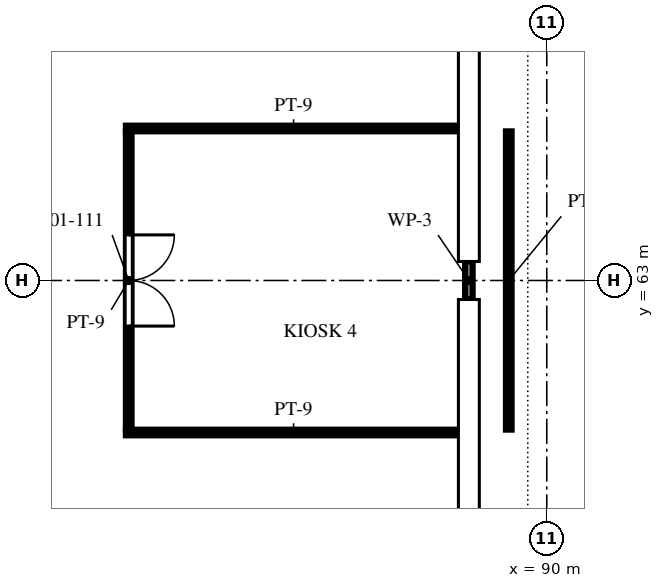
"""IFC4 building model, lengths in metres.
Left out: names, types, materials, properties, quantities, classifications, styles, units other than length and angle.
Written with IfcOpenShell. Run it as: python <this file> out.ifc"""

import sys

from ifc_helpers import new_model, si_unit, direction, frame, frame_2d, origin, place, context, subcontext, project, spatial, polyline, rectangle, outline, extrude, element, fill, save


model = new_model("IFC4")
c1 = context("Model", 3, precision=1e-05, world=origin(), true_north=direction((0.0, 1.0)))
c2 = subcontext(c1, "Body", "Model", "MODEL_VIEW")
j1 = project(units=[si_unit("LENGTHUNIT", "METRE"), si_unit("PLANEANGLEUNIT", "RADIAN")], contexts=[c1])
p1 = place(None, origin())
s1 = spatial("IfcSite", under=j1, at=p1, CompositionType="ELEMENT")
p2 = place(p1, origin())
s2 = spatial("IfcBuilding", under=s1, at=p2, CompositionType="ELEMENT")
p3 = place(p2, frame((0.0, 0.0, 7.5)))
s3 = spatial("IfcBuildingStorey", under=s2, at=p3, CompositionType="ELEMENT", Elevation=7.5)
p4 = place(p3, frame((88.975, 62.75, 0.0), z_axis=(0.0, 0.0, 1.0), x_axis=(0.0, 1.0, 0.0)))
e1 = element("IfcWall", 1, at=p4, inside=s3, PredefinedType="SOLIDWALL", context=c2, shape_type="SweptSolid", body=[
    extrude(rectangle(XDim=0.5, YDim=0.1, at=frame_2d((0.25, 0.0))), origin(), (0.0, 0.0, 1.0), 3.288),
])
p5 = place(p3, frame((88.875, 65.0, 0.0), z_axis=(0.0, 0.0, 1.0), x_axis=(-1.0, 0.0, 0.0)))
e2 = element("IfcWall", 2, at=p5, inside=s3, PredefinedType="PARTITIONING", context=c2, shape_type="SweptSolid", body=[
    extrude(rectangle(XDim=4.413, YDim=0.075, at=frame_2d((2.206, 0.0))), origin(), (0.0, 0.0, 1.0), 3.287),
])
p6 = place(p3, frame((84.5, 64.962, 0.0), z_axis=(0.0, 0.0, 1.0), x_axis=(0.0, -1.0, 0.0)))
e3 = element("IfcWall", 3, at=p6, inside=s3, PredefinedType="PARTITIONING", context=c2, shape_type="SweptSolid", body=[
    extrude(rectangle(XDim=3.925, YDim=0.075, at=frame_2d((1.962, 0.0))), origin(), (0.0, 0.0, 1.0), 3.287),
])
p7 = place(p6, frame((1.363, 0.0, 0.0)))
e4 = element("IfcOpeningElement", 4, at=p7, cuts=e3, PredefinedType="OPENING", context=c2, shape_type="SweptSolid", body=[
    extrude(rectangle(XDim=1.2, YDim=2.1, at=frame_2d((0.6, 1.05))), frame((0.0, 0.047, 0.0), z_axis=(0.0, -1.0, 0.0), x_axis=(1.0, 0.0, 0.0)), (0.0, 0.0, 1.0), 0.095),
])
p8 = place(p3, frame((84.462, 61.0, 0.0), z_axis=(0.0, 0.0, 1.0), x_axis=(1.0, 0.0, 0.0)))
e5 = element("IfcWall", 5, at=p8, inside=s3, PredefinedType="PARTITIONING", context=c2, shape_type="SweptSolid", body=[
    extrude(rectangle(XDim=4.413, YDim=0.075, at=frame_2d((2.206, 0.0))), origin(), (0.0, 0.0, 1.0), 3.287),
])
p9 = place(p3, frame((89.5, 61.038, 0.0), z_axis=(0.0, 0.0, 1.0), x_axis=(0.0, 1.0, 0.0)))
e6 = element("IfcWall", 6, at=p9, inside=s3, PredefinedType="PARTITIONING", context=c2, shape_type="SweptSolid", body=[
    extrude(rectangle(XDim=3.925, YDim=0.075, at=frame_2d((1.962, 0.0))), origin(), (0.0, 0.0, 1.0), 3.287),
])
p10 = place(p7, origin())
e7 = element("IfcDoor", 7, at=p10, inside=s3, OperationType="DOUBLE_DOOR_SINGLE_SWING", PredefinedType="DOOR", context=c2, shape_type="SweptSolid", body=[
    extrude(outline(polyline([(0.0, 0.0), (0.07, 0.0), (0.07, 2.03), (1.13, 2.03), (1.13, 0.0), (1.2, 0.0), (1.2, 2.1), (0.0, 2.1), (0.0, 0.0)])), frame((0.0, 0.025, 0.0), z_axis=(0.0, -1.0, 0.0), x_axis=(1.0, 0.0, 0.0)), (0.0, 0.0, 1.0), 0.05),
    extrude(outline(polyline([(0.074, 0.01), (0.597, 0.01), (0.597, 2.026), (0.074, 2.026), (0.074, 0.01)]), holes=[polyline([(0.178, 0.373), (0.492, 0.373), (0.492, 1.784), (0.178, 1.784), (0.178, 0.373)])]), frame((0.0, 0.017, 0.0), z_axis=(0.0, -1.0, 0.0), x_axis=(1.0, 0.0, 0.0)), (0.0, 0.0, 1.0), 0.035),
    extrude(rectangle(XDim=0.314, YDim=1.411, at=frame_2d((0.335, 1.079))), frame((0.0, 0.009, 0.0), z_axis=(0.0, -1.0, 0.0), x_axis=(1.0, 0.0, 0.0)), (0.0, 0.0, 1.0), 0.017),
    extrude(outline(polyline([(0.603, 0.01), (1.126, 0.01), (1.126, 2.026), (0.603, 2.026), (0.603, 0.01)]), holes=[polyline([(0.708, 0.373), (1.021, 0.373), (1.021, 1.784), (0.708, 1.784), (0.708, 0.373)])]), frame((0.0, 0.017, 0.0), z_axis=(0.0, -1.0, 0.0), x_axis=(1.0, 0.0, 0.0)), (0.0, 0.0, 1.0), 0.035),
    extrude(rectangle(XDim=0.314, YDim=1.411, at=frame_2d((0.865, 1.079))), frame((0.0, 0.009, 0.0), z_axis=(0.0, -1.0, 0.0), x_axis=(1.0, 0.0, 0.0)), (0.0, 0.0, 1.0), 0.017),
])
fill(e4, e7)
save(model, sys.argv[1])
